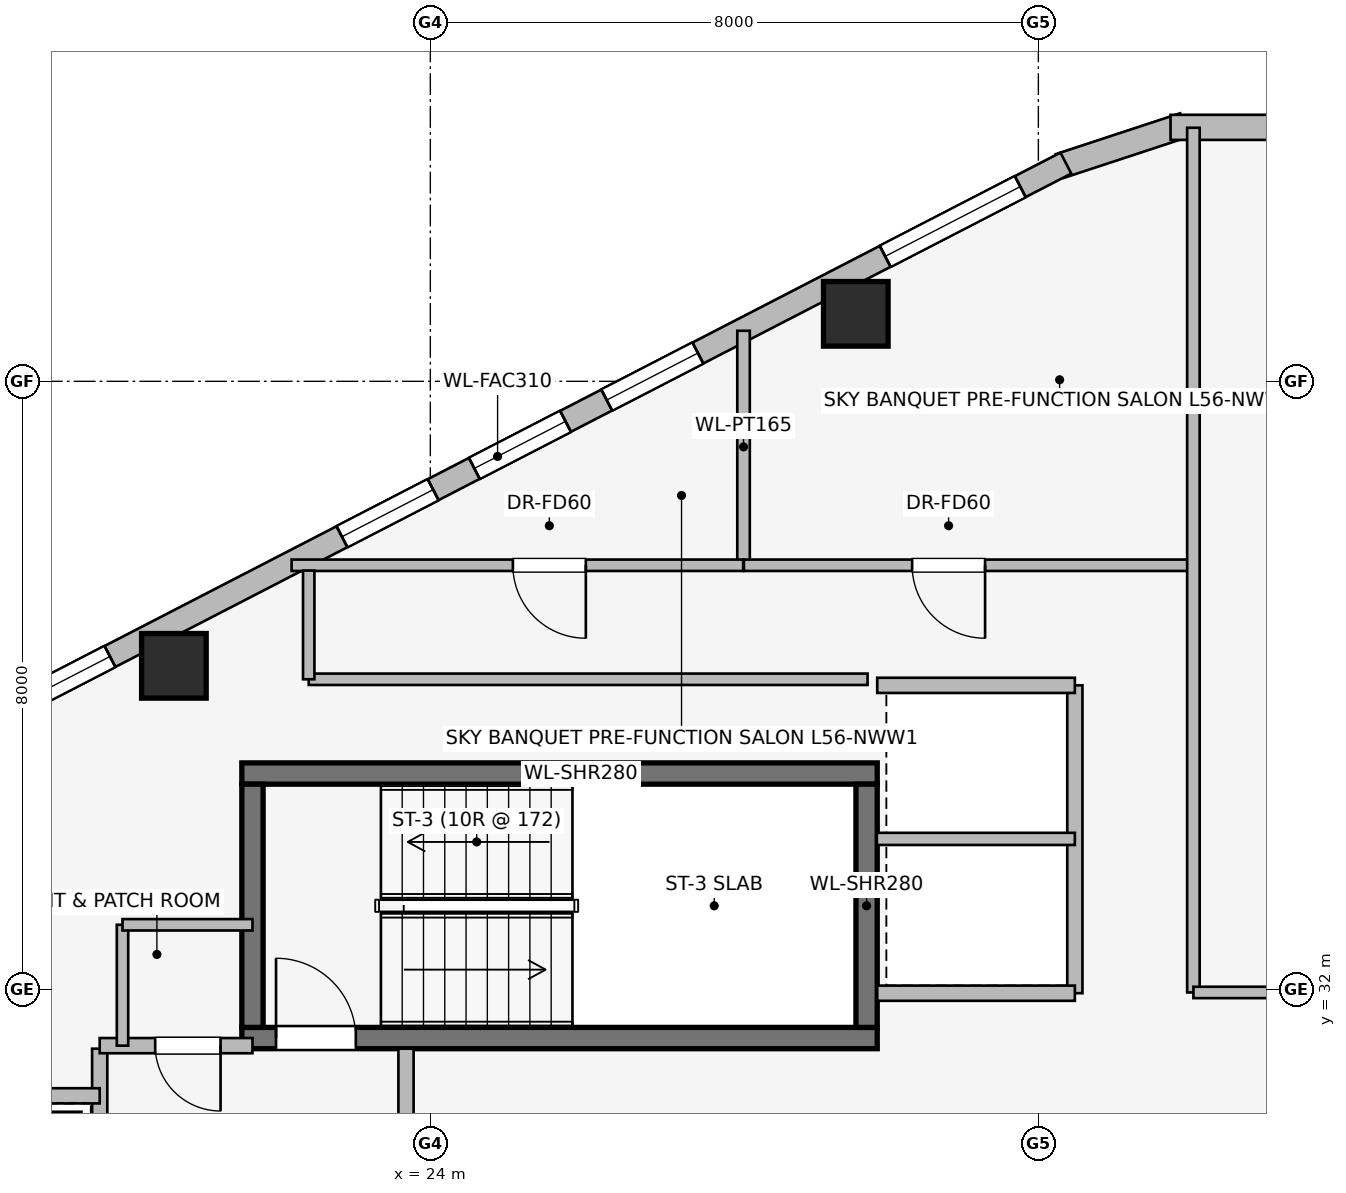
"""IFC4 building model, lengths in metres.
Left out: names, types, materials, properties, quantities, classifications, styles, units other than length and angle.
Written with IfcOpenShell. Run it as: python <this file> out.ifc"""

import sys

from ifc_helpers import new_model, si_unit, direction, frame, frame_2d, origin, origin_2d, place, context, subcontext, project, spatial, rectangle, extrude, element, fill, save


model = new_model("IFC4")
c1 = context("Model", 3, precision=1e-05, world=origin(), true_north=direction((0.0, 1.0)))
c2 = subcontext(c1, "Body", "Model", "MODEL_VIEW")
j1 = project(units=[si_unit("LENGTHUNIT", "METRE"), si_unit("PLANEANGLEUNIT", "RADIAN")], contexts=[c1])
p1 = place(None, origin())
s1 = spatial("IfcSite", under=j1, at=p1, CompositionType="ELEMENT")
p2 = place(p1, origin())
s2 = spatial("IfcBuilding", under=s1, at=p2, CompositionType="ELEMENT")
p3 = place(p2, frame((0.0, 0.0, 206.8)))
s3 = spatial("IfcBuildingStorey", under=s2, at=p3, CompositionType="ELEMENT", Elevation=206.8)
p4 = place(p3, frame((21.52, 31.36, 0.0), z_axis=(0.0, 0.0, 1.0), x_axis=(1.0, 0.0, 0.0)))
e1 = element("IfcWall", 1, at=p4, inside=s3, PredefinedType="SHEAR", context=c2, shape_type="SweptSolid", body=[
    extrude(rectangle(XDim=8.36, YDim=0.28, at=frame_2d((4.18, 0.0))), origin(), (0.0, 0.0, 1.0), 3.45),
])
p5 = place(p4, frame((0.45, 0.0, 0.0)))
e2 = element("IfcOpeningElement", 2, at=p5, cuts=e1, PredefinedType="OPENING", context=c2, shape_type="SweptSolid", body=[
    extrude(rectangle(XDim=1.05, YDim=2.0, at=frame_2d((0.525, 1.0))), frame((0.0, 0.15, 0.0), z_axis=(0.0, -1.0, 0.0), x_axis=(1.0, 0.0, 0.0)), (0.0, 0.0, 1.0), 0.3),
])
p6 = place(p3, frame((29.88, 34.84, 0.0), z_axis=(0.0, 0.0, 1.0), x_axis=(-1.0, 0.0, 0.0)))
e3 = element("IfcWall", 3, at=p6, inside=s3, PredefinedType="SHEAR", context=c2, shape_type="SweptSolid", body=[
    extrude(rectangle(XDim=8.36, YDim=0.28, at=frame_2d((4.18, 0.0))), origin(), (0.0, 0.0, 1.0), 3.45),
])
for number, where, z_axis, x_axis in (
    (4, (21.66, 34.7, 0.0), (0.0, 0.0, 1.0), (0.0, -1.0, 0.0)),
    (5, (29.74, 31.5, 0.0), (0.0, 0.0, 1.0), (0.0, 1.0, 0.0)),
):
    element("IfcWall", number, at=place(p3, frame(where, z_axis=z_axis, x_axis=x_axis)), inside=s3, PredefinedType="SHEAR", context=c2, shape_type="SweptSolid", body=[
        extrude(rectangle(XDim=3.2, YDim=0.28, at=frame_2d((1.6, 0.0))), origin(), (0.0, 0.0, 1.0), 3.45),
    ])
for number, where, z_axis, x_axis in (
    (6, (29.598, 40.888, 0.0), (0.0, 0.0, 1.0), (1.0, 0.0, 0.0)),
    (7, (20.626, 36.257, 0.0), (0.0, 0.0, 1.0), (1.0, 0.0, 0.0)),
):
    element("IfcColumn", number, at=place(p3, frame(where, z_axis=z_axis, x_axis=x_axis)), inside=s3, PredefinedType="COLUMN", context=c2, shape_type="SweptSolid", body=[
        extrude(rectangle(XDim=0.85, YDim=0.85, at=origin_2d()), origin(), (0.0, 0.0, 1.0), 3.45),
    ])
p7 = place(p3, frame((32.281, 42.832, 0.0), z_axis=(0.0, 0.0, 1.0), x_axis=(0.949937416267, 0.312440242569, 0.0)))
e8 = element("IfcWall", 8, at=p7, inside=s3, PredefinedType="STANDARD", context=c2, shape_type="SweptSolid", body=[
    extrude(rectangle(XDim=1.722, YDim=0.33, at=frame_2d((0.861, 0.0))), origin(), (0.0, 0.0, 1.0), 3.19),
])
p8 = place(p3, frame((33.739, 43.341, 0.0), z_axis=(0.0, 0.0, 1.0), x_axis=(1.0, 0.0, 0.0)))
e9 = element("IfcWall", 9, at=p8, inside=s3, PredefinedType="STANDARD", context=c2, shape_type="SweptSolid", body=[
    extrude(rectangle(XDim=1.722, YDim=0.33, at=frame_2d((0.861, 0.0))), origin(), (0.0, 0.0, 1.0), 3.19),
])
p9 = place(p3, frame((17.408, 35.153, 0.0), z_axis=(0.0, 0.0, 1.0), x_axis=(0.888626188278, 0.458632202867, 0.0)))
e10 = element("IfcWall", 10, at=p9, inside=s3, PredefinedType="STANDARD", context=c2, shape_type="SweptSolid", body=[
    extrude(rectangle(XDim=16.828, YDim=0.31, at=frame_2d((8.414, 0.0))), origin(), (0.0, 0.0, 1.0), 3.19),
])
p10 = place(p9, frame((0.675, 0.0, 0.75)))
e11 = element("IfcOpeningElement", 11, at=p10, cuts=e10, PredefinedType="OPENING", context=c2, shape_type="SweptSolid", body=[
    extrude(rectangle(XDim=2.0, YDim=1.5, at=frame_2d((1.0, 0.75))), frame((0.0, 0.165, 0.0), z_axis=(0.0, -1.0, 0.0), x_axis=(1.0, 0.0, 0.0)), (0.0, 0.0, 1.0), 0.33),
])
p11 = place(p9, frame((6.11, 0.0, 0.75)))
e12 = element("IfcOpeningElement", 12, at=p11, cuts=e10, PredefinedType="OPENING", context=c2, shape_type="SweptSolid", body=[
    extrude(rectangle(XDim=1.35, YDim=1.45, at=frame_2d((0.675, 0.725))), frame((0.0, 0.165, 0.0), z_axis=(0.0, -1.0, 0.0), x_axis=(1.0, 0.0, 0.0)), (0.0, 0.0, 1.0), 0.33),
])
p12 = place(p9, frame((8.07, 0.0, 0.75)))
e13 = element("IfcOpeningElement", 13, at=p12, cuts=e10, PredefinedType="OPENING", context=c2, shape_type="SweptSolid", body=[
    extrude(rectangle(XDim=1.35, YDim=1.45, at=frame_2d((0.675, 0.725))), frame((0.0, 0.165, 0.0), z_axis=(0.0, -1.0, 0.0), x_axis=(1.0, 0.0, 0.0)), (0.0, 0.0, 1.0), 0.33),
])
p13 = place(p9, frame((10.03, 0.0, 0.75)))
e14 = element("IfcOpeningElement", 14, at=p13, cuts=e10, PredefinedType="OPENING", context=c2, shape_type="SweptSolid", body=[
    extrude(rectangle(XDim=1.35, YDim=1.45, at=frame_2d((0.675, 0.725))), frame((0.0, 0.165, 0.0), z_axis=(0.0, -1.0, 0.0), x_axis=(1.0, 0.0, 0.0)), (0.0, 0.0, 1.0), 0.33),
])
p14 = place(p9, frame((14.153, 0.0, 0.75)))
e15 = element("IfcOpeningElement", 15, at=p14, cuts=e10, PredefinedType="OPENING", context=c2, shape_type="SweptSolid", body=[
    extrude(rectangle(XDim=2.0, YDim=1.5, at=frame_2d((1.0, 0.75))), frame((0.0, 0.165, 0.0), z_axis=(0.0, -1.0, 0.0), x_axis=(1.0, 0.0, 0.0)), (0.0, 0.0, 1.0), 0.33),
])
p15 = place(p3, frame((19.65, 25.68, 0.0), z_axis=(0.0, 0.0, 1.0), x_axis=(0.0, 1.0, 0.0)))
e16 = element("IfcWall", 16, at=p15, inside=s3, PredefinedType="PARTITIONING", context=c2, shape_type="SweptSolid", body=[
    extrude(rectangle(XDim=5.54, YDim=0.2, at=frame_2d((2.77, 0.0))), origin(), (0.0, 0.0, 1.0), 3.19),
])
p16 = place(p15, frame((0.62, 0.0, 0.0)))
e17 = element("IfcOpeningElement", 17, at=p16, cuts=e16, PredefinedType="OPENING", context=c2, shape_type="SweptSolid", body=[
    extrude(rectangle(XDim=1.1, YDim=2.2, at=frame_2d((0.55, 1.1))), frame((0.0, 0.11, 0.0), z_axis=(0.0, -1.0, 0.0), x_axis=(1.0, 0.0, 0.0)), (0.0, 0.0, 1.0), 0.22),
])
p17 = place(p15, frame((3.12, 0.0, 0.0)))
e18 = element("IfcOpeningElement", 18, at=p17, cuts=e16, PredefinedType="OPENING", context=c2, shape_type="SweptSolid", body=[
    extrude(rectangle(XDim=1.1, YDim=2.2, at=frame_2d((0.55, 1.1))), frame((0.0, 0.11, 0.0), z_axis=(0.0, -1.0, 0.0), x_axis=(1.0, 0.0, 0.0)), (0.0, 0.0, 1.0), 0.22),
])
p18 = place(p3, frame((23.68, 25.68, 0.0), z_axis=(0.0, 0.0, 1.0), x_axis=(0.0, 1.0, 0.0)))
e19 = element("IfcWall", 19, at=p18, inside=s3, PredefinedType="PARTITIONING", context=c2, shape_type="SweptSolid", body=[
    extrude(rectangle(XDim=5.54, YDim=0.2, at=frame_2d((2.77, 0.0))), origin(), (0.0, 0.0, 1.0), 3.19),
])
p19 = place(p18, frame((1.8, 0.0, 0.0)))
e20 = element("IfcOpeningElement", 20, at=p19, cuts=e19, PredefinedType="OPENING", context=c2, shape_type="SweptSolid", body=[
    extrude(rectangle(XDim=1.05, YDim=2.0, at=frame_2d((0.525, 1.0))), frame((0.0, 0.11, 0.0), z_axis=(0.0, -1.0, 0.0), x_axis=(1.0, 0.0, 0.0)), (0.0, 0.0, 1.0), 0.22),
])
p20 = place(p3, frame((21.66, 31.26, 0.0), z_axis=(0.0, 0.0, 1.0), x_axis=(-1.0, 0.0, 0.0)))
e21 = element("IfcWall", 21, at=p20, inside=s3, PredefinedType="PARTITIONING", context=c2, shape_type="SweptSolid", body=[
    extrude(rectangle(XDim=2.01, YDim=0.2, at=frame_2d((1.005, 0.0))), origin(), (0.0, 0.0, 1.0), 3.19),
])
p21 = place(p20, frame((0.42, 0.0, 0.0)))
e22 = element("IfcOpeningElement", 22, at=p21, cuts=e21, PredefinedType="OPENING", context=c2, shape_type="SweptSolid", body=[
    extrude(rectangle(XDim=0.86, YDim=2.0, at=frame_2d((0.43, 1.0))), frame((0.0, 0.11, 0.0), z_axis=(0.0, -1.0, 0.0), x_axis=(1.0, 0.0, 0.0)), (0.0, 0.0, 1.0), 0.22),
])
p22 = place(p3, frame((19.65, 30.6, 0.0), z_axis=(0.0, 0.0, 1.0), x_axis=(-1.0, 0.0, 0.0)))
e23 = element("IfcWall", 23, at=p22, inside=s3, PredefinedType="PARTITIONING", context=c2, shape_type="SweptSolid", body=[
    extrude(rectangle(XDim=2.5, YDim=0.2, at=frame_2d((1.25, 0.0))), origin(), (0.0, 0.0, 1.0), 2.09),
])
p23 = place(p3, frame((32.48, 31.95, 0.0), z_axis=(0.0, 0.0, 1.0), x_axis=(0.0, 1.0, 0.0)))
e24 = element("IfcWall", 24, at=p23, inside=s3, PredefinedType="PARTITIONING", context=c2, shape_type="SweptSolid", body=[
    extrude(rectangle(XDim=4.05, YDim=0.2, at=frame_2d((2.025, 0.0))), origin(), (0.0, 0.0, 1.0), 3.19),
])
for number, where, z_axis, x_axis in (
    (25, (29.88, 36.0, 0.0), (0.0, 0.0, 1.0), (1.0, 0.0, 0.0)),
    (26, (32.48, 31.95, 0.0), (0.0, 0.0, 1.0), (-1.0, 0.0, 0.0)),
):
    element("IfcWall", number, at=place(p3, frame(where, z_axis=z_axis, x_axis=x_axis)), inside=s3, PredefinedType="PARTITIONING", context=c2, shape_type="SweptSolid", body=[
        extrude(rectangle(XDim=2.6, YDim=0.2, at=frame_2d((1.3, 0.0))), origin(), (0.0, 0.0, 1.0), 3.19),
    ])
p24 = place(p3, frame((29.875, 33.98, 0.0), z_axis=(0.0, 0.0, 1.0), x_axis=(1.0, 0.0, 0.0)))
e27 = element("IfcWall", 27, at=p24, inside=s3, PredefinedType="PARTITIONING", context=c2, shape_type="SweptSolid", body=[
    extrude(rectangle(XDim=2.605, YDim=0.16, at=frame_2d((1.302, 0.0))), origin(), (0.0, 0.0, 1.0), 2.582),
])
p25 = place(p3, frame((19.95, 32.85, 0.0), z_axis=(0.0, 0.0, 1.0), x_axis=(0.0, -1.0, 0.0)))
e28 = element("IfcWall", 28, at=p25, inside=s3, PredefinedType="PARTITIONING", context=c2, shape_type="SweptSolid", body=[
    extrude(rectangle(XDim=1.59, YDim=0.15, at=frame_2d((0.795, 0.0))), origin(), (0.0, 0.0, 1.0), 3.19),
])
p26 = place(p3, frame((21.66, 32.85, 0.0), z_axis=(0.0, 0.0, 1.0), x_axis=(-1.0, 0.0, 0.0)))
e29 = element("IfcWall", 29, at=p26, inside=s3, PredefinedType="PARTITIONING", context=c2, shape_type="SweptSolid", body=[
    extrude(rectangle(XDim=1.71, YDim=0.15, at=frame_2d((0.855, 0.0))), origin(), (0.0, 0.0, 1.0), 3.19),
])
p27 = place(p3, frame((28.121, 37.61, 0.0), z_axis=(0.0, 0.0, 1.0), x_axis=(0.0, 1.0, 0.0)))
e30 = element("IfcWall", 30, at=p27, inside=s3, PredefinedType="PARTITIONING", context=c2, shape_type="SweptSolid", body=[
    extrude(rectangle(XDim=3.055, YDim=0.165, at=frame_2d((1.527, 0.0))), origin(), (0.0, 0.0, 1.0), 3.19),
])
p28 = place(p3, frame((28.116, 37.58, 0.0), z_axis=(0.0, 0.0, 1.0), x_axis=(-1.0, 0.0, 0.0)))
e31 = element("IfcWall", 31, at=p28, inside=s3, PredefinedType="PARTITIONING", context=c2, shape_type="SweptSolid", body=[
    extrude(rectangle(XDim=5.941, YDim=0.15, at=frame_2d((2.97, 0.0))), origin(), (0.0, 0.0, 1.0), 3.19),
])
p29 = place(p28, frame((2.07, 0.0, 0.0)))
e32 = element("IfcOpeningElement", 32, at=p29, cuts=e31, PredefinedType="OPENING", context=c2, shape_type="SweptSolid", body=[
    extrude(rectangle(XDim=0.96, YDim=2.0, at=frame_2d((0.48, 1.0))), frame((0.0, 0.085, 0.0), z_axis=(0.0, -1.0, 0.0), x_axis=(1.0, 0.0, 0.0)), (0.0, 0.0, 1.0), 0.17),
])
p30 = place(p3, frame((33.962, 37.58, 0.0), z_axis=(0.0, 0.0, 1.0), x_axis=(-1.0, 0.0, 0.0)))
e33 = element("IfcWall", 33, at=p30, inside=s3, PredefinedType="PARTITIONING", context=c2, shape_type="SweptSolid", body=[
    extrude(rectangle(XDim=5.836, YDim=0.15, at=frame_2d((2.918, 0.0))), origin(), (0.0, 0.0, 1.0), 2.582),
])
p31 = place(p30, frame((2.663, 0.0, 0.0)))
e34 = element("IfcOpeningElement", 34, at=p31, cuts=e33, PredefinedType="OPENING", context=c2, shape_type="SweptSolid", body=[
    extrude(rectangle(XDim=0.96, YDim=2.0, at=frame_2d((0.48, 1.0))), frame((0.0, 0.085, 0.0), z_axis=(0.0, -1.0, 0.0), x_axis=(1.0, 0.0, 0.0)), (0.0, 0.0, 1.0), 0.17),
])
p32 = place(p3, frame((34.04, 31.96, 0.0), z_axis=(0.0, 0.0, 1.0), x_axis=(0.0, 1.0, 0.0)))
e35 = element("IfcWall", 35, at=p32, inside=s3, PredefinedType="PARTITIONING", context=c2, shape_type="SweptSolid", body=[
    extrude(rectangle(XDim=11.376, YDim=0.165, at=frame_2d((5.688, 0.0))), origin(), (0.0, 0.0, 1.0), 3.19),
])
p33 = place(p3, frame((41.46, 31.96, 0.0), z_axis=(0.0, 0.0, 1.0), x_axis=(-1.0, 0.0, 0.0)))
e36 = element("IfcWall", 36, at=p33, inside=s3, PredefinedType="PARTITIONING", context=c2, shape_type="SweptSolid", body=[
    extrude(rectangle(XDim=7.42, YDim=0.15, at=frame_2d((3.71, 0.0))), origin(), (0.0, 0.0, 1.0), 3.19),
])
p34 = place(p33, frame((3.23, 0.0, 0.0)))
e37 = element("IfcOpeningElement", 37, at=p34, cuts=e36, PredefinedType="OPENING", context=c2, shape_type="SweptSolid", body=[
    extrude(rectangle(XDim=0.96, YDim=2.0, at=frame_2d((0.48, 1.0))), frame((0.0, 0.085, 0.0), z_axis=(0.0, -1.0, 0.0), x_axis=(1.0, 0.0, 0.0)), (0.0, 0.0, 1.0), 0.17),
])
p35 = place(p3, frame((29.753, 36.08, 0.0), z_axis=(0.0, 0.0, 1.0), x_axis=(-1.0, 0.0, 0.0)))
e38 = element("IfcWall", 38, at=p35, inside=s3, PredefinedType="PARTITIONING", context=c2, shape_type="SweptSolid", body=[
    extrude(rectangle(XDim=7.353, YDim=0.15, at=frame_2d((3.677, 0.0))), origin(), (0.0, 0.0, 1.0), 3.19),
])
p36 = place(p3, frame((22.4, 36.08, 0.0), z_axis=(0.0, 0.0, 1.0), x_axis=(0.0, 1.0, 0.0)))
e39 = element("IfcWall", 39, at=p36, inside=s3, PredefinedType="PARTITIONING", context=c2, shape_type="SweptSolid", body=[
    extrude(rectangle(XDim=1.43, YDim=0.15, at=frame_2d((0.715, 0.0))), origin(), (0.0, 0.0, 1.0), 3.19),
])
p37 = place(p10, origin())
e40 = element("IfcWindow", 40, at=p37, inside=s3, PartitioningType="SINGLE_PANEL", PredefinedType="WINDOW", context=c2, shape_type="SweptSolid", body=[
    extrude(rectangle(XDim=2.0, YDim=1.5, at=frame_2d((1.0, 0.75))), frame((0.0, 0.03, 0.0), z_axis=(0.0, -1.0, 0.0), x_axis=(1.0, 0.0, 0.0)), (0.0, 0.0, 1.0), 0.06),
])
fill(e11, e40)
p38 = place(p11, origin())
e41 = element("IfcWindow", 41, at=p38, inside=s3, PartitioningType="SINGLE_PANEL", PredefinedType="WINDOW", context=c2, shape_type="SweptSolid", body=[
    extrude(rectangle(XDim=1.35, YDim=1.45, at=frame_2d((0.675, 0.725))), frame((0.0, 0.03, 0.0), z_axis=(0.0, -1.0, 0.0), x_axis=(1.0, 0.0, 0.0)), (0.0, 0.0, 1.0), 0.06),
])
fill(e12, e41)
p39 = place(p12, origin())
e42 = element("IfcWindow", 42, at=p39, inside=s3, PartitioningType="SINGLE_PANEL", PredefinedType="WINDOW", context=c2, shape_type="SweptSolid", body=[
    extrude(rectangle(XDim=1.35, YDim=1.45, at=frame_2d((0.675, 0.725))), frame((0.0, 0.03, 0.0), z_axis=(0.0, -1.0, 0.0), x_axis=(1.0, 0.0, 0.0)), (0.0, 0.0, 1.0), 0.06),
])
fill(e13, e42)
p40 = place(p13, origin())
e43 = element("IfcWindow", 43, at=p40, inside=s3, PartitioningType="SINGLE_PANEL", PredefinedType="WINDOW", context=c2, shape_type="SweptSolid", body=[
    extrude(rectangle(XDim=1.35, YDim=1.45, at=frame_2d((0.675, 0.725))), frame((0.0, 0.03, 0.0), z_axis=(0.0, -1.0, 0.0), x_axis=(1.0, 0.0, 0.0)), (0.0, 0.0, 1.0), 0.06),
])
fill(e14, e43)
p41 = place(p14, origin())
e44 = element("IfcWindow", 44, at=p41, inside=s3, PartitioningType="SINGLE_PANEL", PredefinedType="WINDOW", context=c2, shape_type="SweptSolid", body=[
    extrude(rectangle(XDim=2.0, YDim=1.5, at=frame_2d((1.0, 0.75))), frame((0.0, 0.03, 0.0), z_axis=(0.0, -1.0, 0.0), x_axis=(1.0, 0.0, 0.0)), (0.0, 0.0, 1.0), 0.06),
])
fill(e15, e44)
p42 = place(p5, origin())
e45 = element("IfcDoor", 45, at=p42, inside=s3, OperationType="SINGLE_SWING_LEFT", PredefinedType="DOOR", context=c2, shape_type="SweptSolid", body=[
    extrude(rectangle(XDim=1.05, YDim=2.0, at=frame_2d((0.525, 1.0))), frame((0.0, 0.025, 0.0), z_axis=(0.0, -1.0, 0.0), x_axis=(1.0, 0.0, 0.0)), (0.0, 0.0, 1.0), 0.05),
])
fill(e2, e45)
p43 = place(p21, origin())
e46 = element("IfcDoor", 46, at=p43, inside=s3, OperationType="SINGLE_SWING_LEFT", PredefinedType="DOOR", context=c2, shape_type="SweptSolid", body=[
    extrude(rectangle(XDim=0.86, YDim=2.0, at=frame_2d((0.43, 1.0))), frame((0.0, 0.025, 0.0), z_axis=(0.0, -1.0, 0.0), x_axis=(1.0, 0.0, 0.0)), (0.0, 0.0, 1.0), 0.05),
])
fill(e22, e46)
p44 = place(p29, origin())
e47 = element("IfcDoor", 47, at=p44, inside=s3, OperationType="SINGLE_SWING_LEFT", PredefinedType="DOOR", context=c2, shape_type="SweptSolid", body=[
    extrude(rectangle(XDim=0.96, YDim=2.0, at=frame_2d((0.48, 1.0))), frame((0.0, 0.025, 0.0), z_axis=(0.0, -1.0, 0.0), x_axis=(1.0, 0.0, 0.0)), (0.0, 0.0, 1.0), 0.05),
])
fill(e32, e47)
p45 = place(p31, origin())
e48 = element("IfcDoor", 48, at=p45, inside=s3, OperationType="SINGLE_SWING_LEFT", PredefinedType="DOOR", context=c2, shape_type="SweptSolid", body=[
    extrude(rectangle(XDim=0.96, YDim=2.0, at=frame_2d((0.48, 1.0))), frame((0.0, 0.025, 0.0), z_axis=(0.0, -1.0, 0.0), x_axis=(1.0, 0.0, 0.0)), (0.0, 0.0, 1.0), 0.05),
])
fill(e34, e48)
save(model, sys.argv[1])
